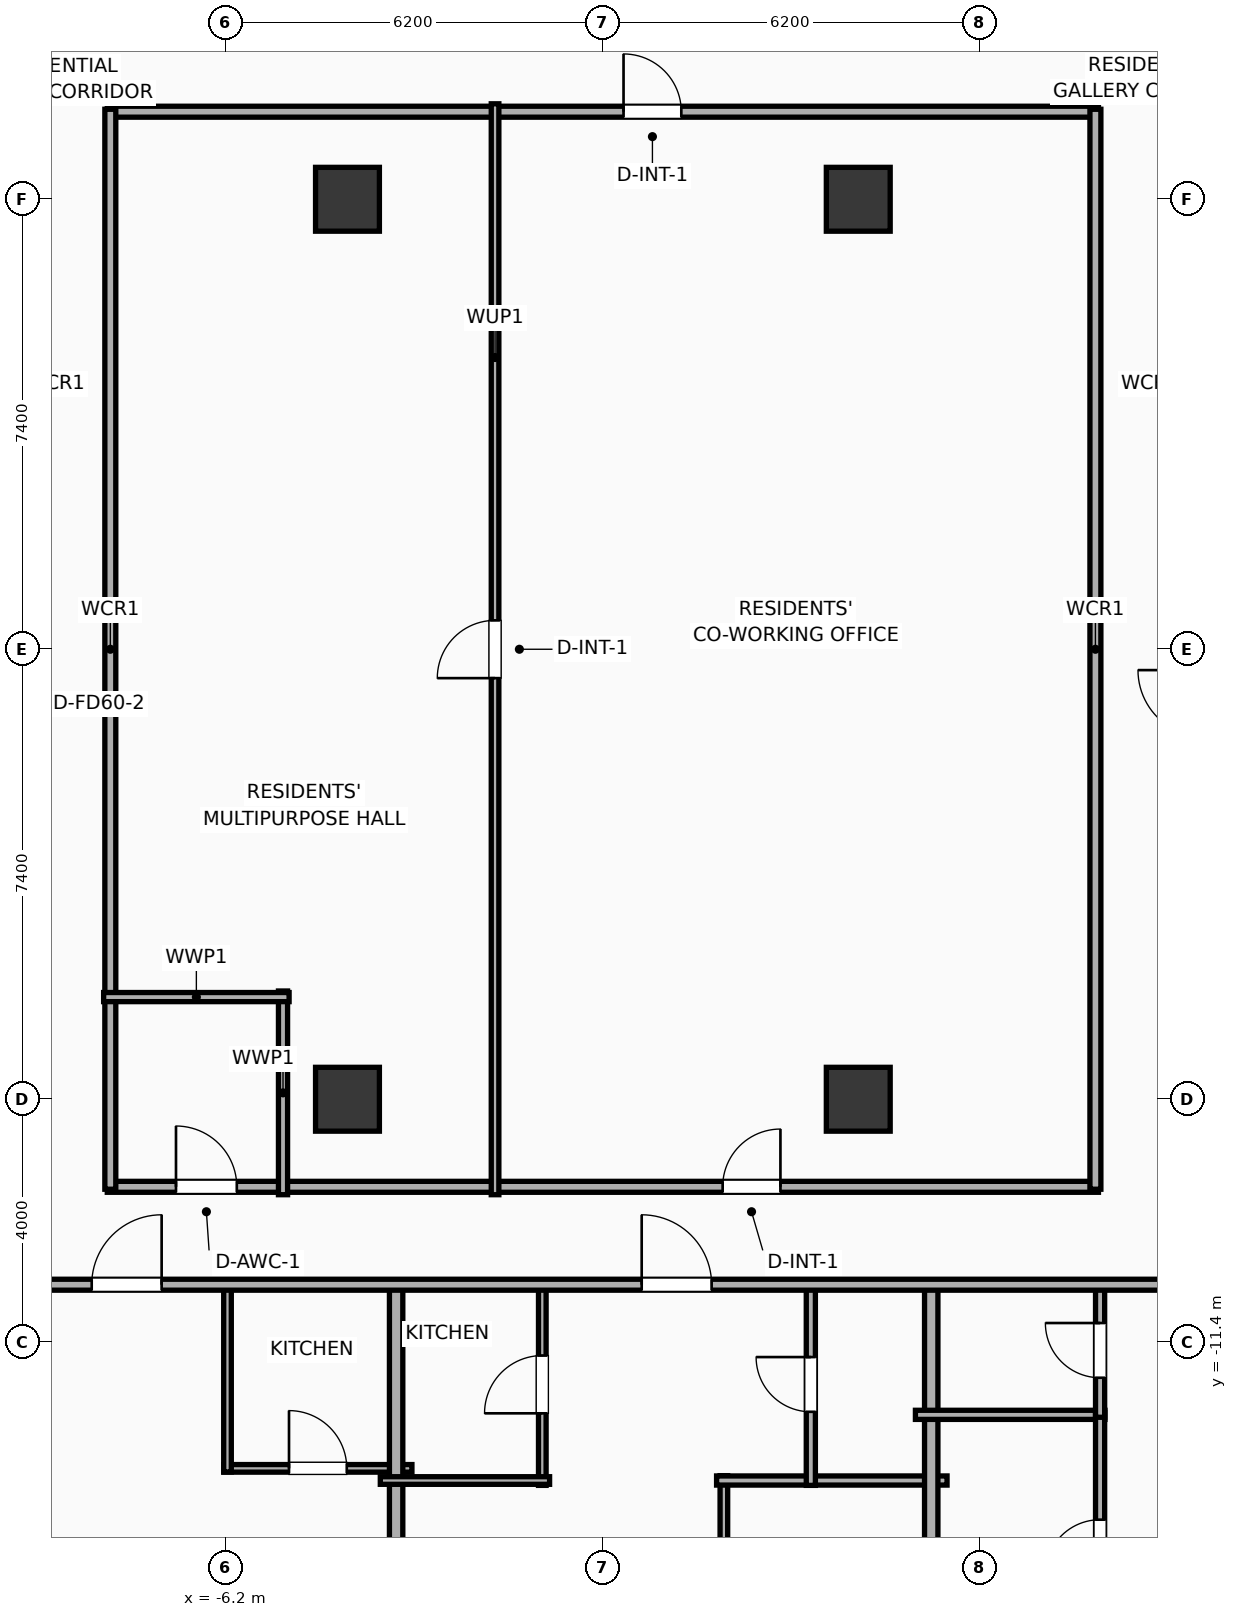
"""IFC4 building model, lengths in metres.
Left out: names, types, materials, properties, quantities, classifications, styles, units other than length and angle.
Written with IfcOpenShell. Run it as: python <this file> out.ifc"""

import sys

from ifc_helpers import new_model, si_unit, direction, frame, frame_2d, origin, origin_2d, place, context, subcontext, project, spatial, rectangle, extrude, element, fill, save


model = new_model("IFC4")
c1 = context("Model", 3, precision=1e-05, world=origin(), true_north=direction((0.0, 1.0)))
c2 = subcontext(c1, "Body", "Model", "MODEL_VIEW")
j1 = project(units=[si_unit("LENGTHUNIT", "METRE"), si_unit("PLANEANGLEUNIT", "RADIAN")], contexts=[c1])
p1 = place(None, origin())
s1 = spatial("IfcSite", under=j1, at=p1, CompositionType="ELEMENT")
p2 = place(p1, origin())
s2 = spatial("IfcBuilding", under=s1, at=p2, CompositionType="ELEMENT")
p3 = place(p2, frame((0.0, 0.0, 117.0)))
s3 = spatial("IfcBuildingStorey", under=s2, at=p3, CompositionType="ELEMENT", Elevation=117.0)
for number, where, z_axis, x_axis in (
    (1, (-4.2, -7.4, 0.0), (0.0, 0.0, 1.0), (1.0, 0.0, 0.0)),
    (2, (-4.2, 7.4, 0.0), (0.0, 0.0, 1.0), (1.0, 0.0, 0.0)),
    (3, (4.2, -7.4, 0.0), (0.0, 0.0, 1.0), (1.0, 0.0, 0.0)),
    (4, (4.2, 7.4, 0.0), (0.0, 0.0, 1.0), (1.0, 0.0, 0.0)),
):
    element("IfcColumn", number, at=place(p3, frame(where, z_axis=z_axis, x_axis=x_axis)), inside=s3, PredefinedType="COLUMN", context=c2, shape_type="SweptSolid", body=[
        extrude(rectangle(XDim=1.05, YDim=1.05, at=origin_2d()), origin(), (0.0, 0.0, 1.0), 3.9),
    ])
p4 = place(p3, frame((-8.15, 8.84, 0.0), z_axis=(0.0, 0.0, 1.0), x_axis=(1.0, 0.0, 0.0)))
e5 = element("IfcWall", 5, at=p4, inside=s3, PredefinedType="PARTITIONING", context=c2, shape_type="SweptSolid", body=[
    extrude(rectangle(XDim=16.3, YDim=0.18, at=frame_2d((8.15, 0.0))), origin(), (0.0, 0.0, 1.0), 3.65),
])
p5 = place(p4, frame((8.49, 0.0, 0.0)))
e6 = element("IfcOpeningElement", 6, at=p5, cuts=e5, PredefinedType="OPENING", context=c2, shape_type="SweptSolid", body=[
    extrude(rectangle(XDim=0.95, YDim=2.05, at=frame_2d((0.475, 1.025))), frame((0.0, 0.1, 0.0), z_axis=(0.0, -1.0, 0.0), x_axis=(1.0, 0.0, 0.0)), (0.0, 0.0, 1.0), 0.2),
])
p6 = place(p3, frame((-8.15, -8.84, 0.0), z_axis=(0.0, 0.0, 1.0), x_axis=(1.0, 0.0, 0.0)))
e7 = element("IfcWall", 7, at=p6, inside=s3, PredefinedType="PARTITIONING", context=c2, shape_type="SweptSolid", body=[
    extrude(rectangle(XDim=16.3, YDim=0.18, at=frame_2d((8.15, 0.0))), origin(), (0.0, 0.0, 1.0), 3.65),
])
p7 = place(p6, frame((1.13, 0.0, 0.0)))
e8 = element("IfcOpeningElement", 8, at=p7, cuts=e7, PredefinedType="OPENING", context=c2, shape_type="SweptSolid", body=[
    extrude(rectangle(XDim=1.0, YDim=2.05, at=frame_2d((0.5, 1.025))), frame((0.0, 0.1, 0.0), z_axis=(0.0, -1.0, 0.0), x_axis=(1.0, 0.0, 0.0)), (0.0, 0.0, 1.0), 0.2),
])
p8 = place(p6, frame((10.12, 0.0, 0.0)))
e9 = element("IfcOpeningElement", 9, at=p8, cuts=e7, PredefinedType="OPENING", context=c2, shape_type="SweptSolid", body=[
    extrude(rectangle(XDim=0.95, YDim=2.05, at=frame_2d((0.475, 1.025))), frame((0.0, 0.1, 0.0), z_axis=(0.0, -1.0, 0.0), x_axis=(1.0, 0.0, 0.0)), (0.0, 0.0, 1.0), 0.2),
])
for number, where, z_axis, x_axis in (
    (10, (-8.1, -8.88, 0.0), (0.0, 0.0, 1.0), (0.0, 1.0, 0.0)),
    (11, (8.1, -8.88, 0.0), (0.0, 0.0, 1.0), (0.0, 1.0, 0.0)),
):
    element("IfcWall", number, at=place(p3, frame(where, z_axis=z_axis, x_axis=x_axis)), inside=s3, PredefinedType="PARTITIONING", context=c2, shape_type="SweptSolid", body=[
        extrude(rectangle(XDim=17.76, YDim=0.18, at=frame_2d((8.88, 0.0))), origin(), (0.0, 0.0, 1.0), 3.65),
    ])
p9 = place(p3, frame((-5.26, -8.97, 0.0), z_axis=(0.0, 0.0, 1.0), x_axis=(0.0, 1.0, 0.0)))
e12 = element("IfcWall", 12, at=p9, inside=s3, PredefinedType="PLUMBINGWALL", context=c2, shape_type="SweptSolid", body=[
    extrude(rectangle(XDim=3.35, YDim=0.15, at=frame_2d((1.675, 0.0))), origin(), (0.0, 0.0, 1.0), 3.65),
])
p10 = place(p3, frame((-8.21, -5.72, 0.0), z_axis=(0.0, 0.0, 1.0), x_axis=(1.0, 0.0, 0.0)))
e13 = element("IfcWall", 13, at=p10, inside=s3, PredefinedType="PLUMBINGWALL", context=c2, shape_type="SweptSolid", body=[
    extrude(rectangle(XDim=3.05, YDim=0.15, at=frame_2d((1.525, 0.0))), origin(), (0.0, 0.0, 1.0), 3.65),
])
p11 = place(p3, frame((-1.773, -8.97, 0.0), z_axis=(0.0, 0.0, 1.0), x_axis=(0.0, 1.0, 0.0)))
e14 = element("IfcWall", 14, at=p11, inside=s3, PredefinedType="PARTITIONING", context=c2, shape_type="SweptSolid", body=[
    extrude(rectangle(XDim=17.94, YDim=0.125, at=frame_2d((8.97, 0.0))), origin(), (0.0, 0.0, 1.0), 3.65),
])
p12 = place(p11, frame((8.495, 0.0, 0.0)))
e15 = element("IfcOpeningElement", 15, at=p12, cuts=e14, PredefinedType="OPENING", context=c2, shape_type="SweptSolid", body=[
    extrude(rectangle(XDim=0.95, YDim=2.05, at=frame_2d((0.475, 1.025))), frame((0.0, 0.073, 0.0), z_axis=(0.0, -1.0, 0.0), x_axis=(1.0, 0.0, 0.0)), (0.0, 0.0, 1.0), 0.145),
])
p13 = place(p3, frame((-6.233, -13.47, 0.0), z_axis=(0.0, 0.0, 1.0), x_axis=(1.0, 0.0, 0.0)))
e16 = element("IfcWall", 16, at=p13, inside=s3, PredefinedType="PARTITIONING", context=c2, shape_type="SweptSolid", body=[
    extrude(rectangle(XDim=3.093, YDim=0.125, at=frame_2d((1.546, 0.0))), origin(), (0.0, 0.0, 1.0), 3.65),
])
p14 = place(p13, frame((1.072, 0.0, 0.0)))
e17 = element("IfcOpeningElement", 17, at=p14, cuts=e16, PredefinedType="OPENING", context=c2, shape_type="SweptSolid", body=[
    extrude(rectangle(XDim=0.95, YDim=2.05, at=frame_2d((0.475, 1.025))), frame((0.0, 0.073, 0.0), z_axis=(0.0, -1.0, 0.0), x_axis=(1.0, 0.0, 0.0)), (0.0, 0.0, 1.0), 0.145),
])
p15 = place(p3, frame((-6.173, -13.53, 0.0), z_axis=(0.0, 0.0, 1.0), x_axis=(0.0, 1.0, 0.0)))
e18 = element("IfcWall", 18, at=p15, inside=s3, PredefinedType="PARTITIONING", context=c2, shape_type="SweptSolid", body=[
    extrude(rectangle(XDim=3.1, YDim=0.125, at=frame_2d((1.55, 0.0))), origin(), (0.0, 0.0, 1.0), 3.65),
])
p16 = place(p3, frame((-3.4, -20.41, 0.0), z_axis=(0.0, 0.0, 1.0), x_axis=(0.0, 1.0, 0.0)))
e19 = element("IfcWall", 19, at=p16, inside=s3, PredefinedType="PARTITIONING", context=c2, shape_type="SweptSolid", body=[
    extrude(rectangle(XDim=10.04, YDim=0.22, at=frame_2d((5.02, 0.0))), origin(), (0.0, 0.0, 1.0), 3.04),
])
p17 = place(p3, frame((1.99, -20.56, 0.0), z_axis=(0.0, 0.0, 1.0), x_axis=(0.0, 1.0, 0.0)))
e20 = element("IfcWall", 20, at=p17, inside=s3, PredefinedType="PARTITIONING", context=c2, shape_type="SweptSolid", body=[
    extrude(rectangle(XDim=6.97, YDim=0.125, at=frame_2d((3.485, 0.0))), origin(), (0.0, 0.0, 1.0), 3.65),
])
p18 = place(p17, frame((4.847, 0.0, 0.0)))
e21 = element("IfcOpeningElement", 21, at=p18, cuts=e20, PredefinedType="OPENING", context=c2, shape_type="SweptSolid", body=[
    extrude(rectangle(XDim=0.9, YDim=2.05, at=frame_2d((0.45, 1.025))), frame((0.0, 0.073, 0.0), z_axis=(0.0, -1.0, 0.0), x_axis=(1.0, 0.0, 0.0)), (0.0, 0.0, 1.0), 0.145),
])
p19 = place(p3, frame((1.87, -13.67, 0.0), z_axis=(0.0, 0.0, 1.0), x_axis=(1.0, 0.0, 0.0)))
e22 = element("IfcWall", 22, at=p19, inside=s3, PredefinedType="PLUMBINGWALL", context=c2, shape_type="SweptSolid", body=[
    extrude(rectangle(XDim=3.79, YDim=0.15, at=frame_2d((1.895, 0.0))), origin(), (0.0, 0.0, 1.0), 3.65),
])
p20 = place(p3, frame((-0.996, -13.75, 0.0), z_axis=(0.0, 0.0, 1.0), x_axis=(0.0, 1.0, 0.0)))
e23 = element("IfcWall", 23, at=p20, inside=s3, PredefinedType="PARTITIONING", context=c2, shape_type="SweptSolid", body=[
    extrude(rectangle(XDim=3.32, YDim=0.125, at=frame_2d((1.66, 0.0))), origin(), (0.0, 0.0, 1.0), 3.65),
])
p21 = place(p20, frame((1.185, 0.0, 0.0)))
e24 = element("IfcOpeningElement", 24, at=p21, cuts=e23, PredefinedType="OPENING", context=c2, shape_type="SweptSolid", body=[
    extrude(rectangle(XDim=0.95, YDim=2.05, at=frame_2d((0.475, 1.025))), frame((0.0, 0.073, 0.0), z_axis=(0.0, -1.0, 0.0), x_axis=(1.0, 0.0, 0.0)), (0.0, 0.0, 1.0), 0.145),
])
p22 = place(p3, frame((-3.66, -13.67, 0.0), z_axis=(0.0, 0.0, 1.0), x_axis=(1.0, 0.0, 0.0)))
e25 = element("IfcWall", 25, at=p22, inside=s3, PredefinedType="PARTITIONING", context=c2, shape_type="SweptSolid", body=[
    extrude(rectangle(XDim=2.784, YDim=0.125, at=frame_2d((1.392, 0.0))), origin(), (0.0, 0.0, 1.0), 3.65),
])
p23 = place(p3, frame((3.42, -13.75, 0.0), z_axis=(0.0, 0.0, 1.0), x_axis=(0.0, 1.0, 0.0)))
e26 = element("IfcWall", 26, at=p23, inside=s3, PredefinedType="PLUMBINGWALL", context=c2, shape_type="SweptSolid", body=[
    extrude(rectangle(XDim=3.32, YDim=0.15, at=frame_2d((1.66, 0.0))), origin(), (0.0, 0.0, 1.0), 3.65),
])
p24 = place(p23, frame((1.21, 0.0, 0.0)))
e27 = element("IfcOpeningElement", 27, at=p24, cuts=e26, PredefinedType="OPENING", context=c2, shape_type="SweptSolid", body=[
    extrude(rectangle(XDim=0.9, YDim=2.05, at=frame_2d((0.45, 1.025))), frame((0.0, 0.085, 0.0), z_axis=(0.0, -1.0, 0.0), x_axis=(1.0, 0.0, 0.0)), (0.0, 0.0, 1.0), 0.17),
])
p25 = place(p3, frame((5.4, -20.41, 0.0), z_axis=(0.0, 0.0, 1.0), x_axis=(0.0, 1.0, 0.0)))
e28 = element("IfcWall", 28, at=p25, inside=s3, PredefinedType="PARTITIONING", context=c2, shape_type="SweptSolid", body=[
    extrude(rectangle(XDim=10.04, YDim=0.22, at=frame_2d((5.02, 0.0))), origin(), (0.0, 0.0, 1.0), 3.04),
])
p26 = place(p3, frame((5.14, -12.59, 0.0), z_axis=(0.0, 0.0, 1.0), x_axis=(1.0, 0.0, 0.0)))
e29 = element("IfcWall", 29, at=p26, inside=s3, PredefinedType="PLUMBINGWALL", context=c2, shape_type="SweptSolid", body=[
    extrude(rectangle(XDim=3.117, YDim=0.15, at=frame_2d((1.559, 0.0))), origin(), (0.0, 0.0, 1.0), 3.65),
])
p27 = place(p3, frame((8.177, -20.458, 0.0), z_axis=(0.0, 0.0, 1.0), x_axis=(0.0, 1.0, 0.0)))
e30 = element("IfcWall", 30, at=p27, inside=s3, PredefinedType="PLUMBINGWALL", context=c2, shape_type="SweptSolid", body=[
    extrude(rectangle(XDim=7.907, YDim=0.15, at=frame_2d((3.954, 0.0))), origin(), (0.0, 0.0, 1.0), 3.65),
])
p28 = place(p27, frame((5.243, 0.0, 0.0)))
e31 = element("IfcOpeningElement", 31, at=p28, cuts=e30, PredefinedType="OPENING", context=c2, shape_type="SweptSolid", body=[
    extrude(rectangle(XDim=0.9, YDim=2.05, at=frame_2d((0.45, 1.025))), frame((0.0, 0.085, 0.0), z_axis=(0.0, -1.0, 0.0), x_axis=(1.0, 0.0, 0.0)), (0.0, 0.0, 1.0), 0.17),
])
p29 = place(p3, frame((8.177, -12.63, 0.0), z_axis=(0.0, 0.0, 1.0), x_axis=(0.0, 1.0, 0.0)))
e32 = element("IfcWall", 32, at=p29, inside=s3, PredefinedType="PLUMBINGWALL", context=c2, shape_type="SweptSolid", body=[
    extrude(rectangle(XDim=2.2, YDim=0.15, at=frame_2d((1.1, 0.0))), origin(), (0.0, 0.0, 1.0), 3.65),
])
p30 = place(p29, frame((0.65, 0.0, 0.0)))
e33 = element("IfcOpeningElement", 33, at=p30, cuts=e32, PredefinedType="OPENING", context=c2, shape_type="SweptSolid", body=[
    extrude(rectangle(XDim=0.9, YDim=2.05, at=frame_2d((0.45, 1.025))), frame((0.0, 0.085, 0.0), z_axis=(0.0, -1.0, 0.0), x_axis=(1.0, 0.0, 0.0)), (0.0, 0.0, 1.0), 0.17),
])
p31 = place(p3, frame((-29.21, -10.45, 0.0), z_axis=(0.0, 0.0, 1.0), x_axis=(1.0, 0.0, 0.0)))
e34 = element("IfcWall", 34, at=p31, inside=s3, PredefinedType="PARTITIONING", context=c2, shape_type="SweptSolid", body=[
    extrude(rectangle(XDim=62.42, YDim=0.18, at=frame_2d((31.21, 0.0))), origin(), (0.0, 0.0, 1.0), 3.65),
])
p32 = place(p31, frame((3.813, 0.0, 0.0)))
e35 = element("IfcOpeningElement", 35, at=p32, cuts=e34, PredefinedType="OPENING", context=c2, shape_type="SweptSolid", body=[
    extrude(rectangle(XDim=1.15, YDim=2.05, at=frame_2d((0.575, 1.025))), frame((0.0, 0.1, 0.0), z_axis=(0.0, -1.0, 0.0), x_axis=(1.0, 0.0, 0.0)), (0.0, 0.0, 1.0), 0.2),
])
p33 = place(p31, frame((12.271, 0.0, 0.0)))
e36 = element("IfcOpeningElement", 36, at=p33, cuts=e34, PredefinedType="OPENING", context=c2, shape_type="SweptSolid", body=[
    extrude(rectangle(XDim=1.15, YDim=2.05, at=frame_2d((0.575, 1.025))), frame((0.0, 0.1, 0.0), z_axis=(0.0, -1.0, 0.0), x_axis=(1.0, 0.0, 0.0)), (0.0, 0.0, 1.0), 0.2),
])
p34 = place(p31, frame((20.804, 0.0, 0.0)))
e37 = element("IfcOpeningElement", 37, at=p34, cuts=e34, PredefinedType="OPENING", context=c2, shape_type="SweptSolid", body=[
    extrude(rectangle(XDim=1.15, YDim=2.05, at=frame_2d((0.575, 1.025))), frame((0.0, 0.1, 0.0), z_axis=(0.0, -1.0, 0.0), x_axis=(1.0, 0.0, 0.0)), (0.0, 0.0, 1.0), 0.2),
])
p35 = place(p31, frame((29.848, 0.0, 0.0)))
e38 = element("IfcOpeningElement", 38, at=p35, cuts=e34, PredefinedType="OPENING", context=c2, shape_type="SweptSolid", body=[
    extrude(rectangle(XDim=1.15, YDim=2.05, at=frame_2d((0.575, 1.025))), frame((0.0, 0.1, 0.0), z_axis=(0.0, -1.0, 0.0), x_axis=(1.0, 0.0, 0.0)), (0.0, 0.0, 1.0), 0.2),
])
p36 = place(p31, frame((38.45, 0.0, 0.0)))
e39 = element("IfcOpeningElement", 39, at=p36, cuts=e34, PredefinedType="OPENING", context=c2, shape_type="SweptSolid", body=[
    extrude(rectangle(XDim=1.15, YDim=2.05, at=frame_2d((0.575, 1.025))), frame((0.0, 0.1, 0.0), z_axis=(0.0, -1.0, 0.0), x_axis=(1.0, 0.0, 0.0)), (0.0, 0.0, 1.0), 0.2),
])
p37 = place(p31, frame((47.42, 0.0, 0.0)))
e40 = element("IfcOpeningElement", 40, at=p37, cuts=e34, PredefinedType="OPENING", context=c2, shape_type="SweptSolid", body=[
    extrude(rectangle(XDim=1.15, YDim=2.05, at=frame_2d((0.575, 1.025))), frame((0.0, 0.1, 0.0), z_axis=(0.0, -1.0, 0.0), x_axis=(1.0, 0.0, 0.0)), (0.0, 0.0, 1.0), 0.2),
])
p38 = place(p31, frame((56.92, 0.0, 0.0)))
e41 = element("IfcOpeningElement", 41, at=p38, cuts=e34, PredefinedType="OPENING", context=c2, shape_type="SweptSolid", body=[
    extrude(rectangle(XDim=1.15, YDim=2.05, at=frame_2d((0.575, 1.025))), frame((0.0, 0.1, 0.0), z_axis=(0.0, -1.0, 0.0), x_axis=(1.0, 0.0, 0.0)), (0.0, 0.0, 1.0), 0.2),
])
p39 = place(p5, origin())
e42 = element("IfcDoor", 42, at=p39, inside=s3, OperationType="SINGLE_SWING_LEFT", PredefinedType="DOOR", context=c2, shape_type="SweptSolid", body=[
    extrude(rectangle(XDim=0.95, YDim=2.05, at=frame_2d((0.475, 1.025))), frame((0.0, 0.025, 0.0), z_axis=(0.0, -1.0, 0.0), x_axis=(1.0, 0.0, 0.0)), (0.0, 0.0, 1.0), 0.05),
])
fill(e6, e42)
p40 = place(p7, origin())
e43 = element("IfcDoor", 43, at=p40, inside=s3, OperationType="SINGLE_SWING_LEFT", PredefinedType="DOOR", context=c2, shape_type="SweptSolid", body=[
    extrude(rectangle(XDim=1.0, YDim=2.05, at=frame_2d((0.5, 1.025))), frame((0.0, 0.025, 0.0), z_axis=(0.0, -1.0, 0.0), x_axis=(1.0, 0.0, 0.0)), (0.0, 0.0, 1.0), 0.05),
])
fill(e8, e43)
p41 = place(p8, origin())
e44 = element("IfcDoor", 44, at=p41, inside=s3, OperationType="SINGLE_SWING_RIGHT", PredefinedType="DOOR", context=c2, shape_type="SweptSolid", body=[
    extrude(rectangle(XDim=0.95, YDim=2.05, at=frame_2d((0.475, 1.025))), frame((0.0, 0.025, 0.0), z_axis=(0.0, -1.0, 0.0), x_axis=(1.0, 0.0, 0.0)), (0.0, 0.0, 1.0), 0.05),
])
fill(e9, e44)
p42 = place(p12, origin())
e45 = element("IfcDoor", 45, at=p42, inside=s3, OperationType="SINGLE_SWING_LEFT", PredefinedType="DOOR", context=c2, shape_type="SweptSolid", body=[
    extrude(rectangle(XDim=0.95, YDim=2.05, at=frame_2d((0.475, 1.025))), frame((0.0, 0.025, 0.0), z_axis=(0.0, -1.0, 0.0), x_axis=(1.0, 0.0, 0.0)), (0.0, 0.0, 1.0), 0.05),
])
fill(e15, e45)
p43 = place(p14, origin())
e46 = element("IfcDoor", 46, at=p43, inside=s3, OperationType="SINGLE_SWING_LEFT", PredefinedType="DOOR", context=c2, shape_type="SweptSolid", body=[
    extrude(rectangle(XDim=0.95, YDim=2.05, at=frame_2d((0.475, 1.025))), frame((0.0, 0.025, 0.0), z_axis=(0.0, -1.0, 0.0), x_axis=(1.0, 0.0, 0.0)), (0.0, 0.0, 1.0), 0.05),
])
fill(e17, e46)
p44 = place(p21, origin())
e47 = element("IfcDoor", 47, at=p44, inside=s3, OperationType="SINGLE_SWING_LEFT", PredefinedType="DOOR", context=c2, shape_type="SweptSolid", body=[
    extrude(rectangle(XDim=0.95, YDim=2.05, at=frame_2d((0.475, 1.025))), frame((0.0, 0.025, 0.0), z_axis=(0.0, -1.0, 0.0), x_axis=(1.0, 0.0, 0.0)), (0.0, 0.0, 1.0), 0.05),
])
fill(e24, e47)
p45 = place(p24, origin())
e48 = element("IfcDoor", 48, at=p45, inside=s3, OperationType="SINGLE_SWING_RIGHT", PredefinedType="DOOR", context=c2, shape_type="SweptSolid", body=[
    extrude(rectangle(XDim=0.9, YDim=2.05, at=frame_2d((0.45, 1.025))), frame((0.0, 0.025, 0.0), z_axis=(0.0, -1.0, 0.0), x_axis=(1.0, 0.0, 0.0)), (0.0, 0.0, 1.0), 0.05),
])
fill(e27, e48)
p46 = place(p28, origin())
e49 = element("IfcDoor", 49, at=p46, inside=s3, OperationType="SINGLE_SWING_LEFT", PredefinedType="DOOR", context=c2, shape_type="SweptSolid", body=[
    extrude(rectangle(XDim=0.9, YDim=2.05, at=frame_2d((0.45, 1.025))), frame((0.0, 0.025, 0.0), z_axis=(0.0, -1.0, 0.0), x_axis=(1.0, 0.0, 0.0)), (0.0, 0.0, 1.0), 0.05),
])
fill(e31, e49)
p47 = place(p30, origin())
e50 = element("IfcDoor", 50, at=p47, inside=s3, OperationType="SINGLE_SWING_RIGHT", PredefinedType="DOOR", context=c2, shape_type="SweptSolid", body=[
    extrude(rectangle(XDim=0.9, YDim=2.05, at=frame_2d((0.45, 1.025))), frame((0.0, 0.025, 0.0), z_axis=(0.0, -1.0, 0.0), x_axis=(1.0, 0.0, 0.0)), (0.0, 0.0, 1.0), 0.05),
])
fill(e33, e50)
p48 = place(p34, origin())
e51 = element("IfcDoor", 51, at=p48, inside=s3, OperationType="SINGLE_SWING_RIGHT", PredefinedType="DOOR", context=c2, shape_type="SweptSolid", body=[
    extrude(rectangle(XDim=1.15, YDim=2.05, at=frame_2d((0.575, 1.025))), frame((0.0, 0.025, 0.0), z_axis=(0.0, -1.0, 0.0), x_axis=(1.0, 0.0, 0.0)), (0.0, 0.0, 1.0), 0.05),
])
fill(e37, e51)
p49 = place(p35, origin())
e52 = element("IfcDoor", 52, at=p49, inside=s3, OperationType="SINGLE_SWING_LEFT", PredefinedType="DOOR", context=c2, shape_type="SweptSolid", body=[
    extrude(rectangle(XDim=1.15, YDim=2.05, at=frame_2d((0.575, 1.025))), frame((0.0, 0.025, 0.0), z_axis=(0.0, -1.0, 0.0), x_axis=(1.0, 0.0, 0.0)), (0.0, 0.0, 1.0), 0.05),
])
fill(e38, e52)
save(model, sys.argv[1])
